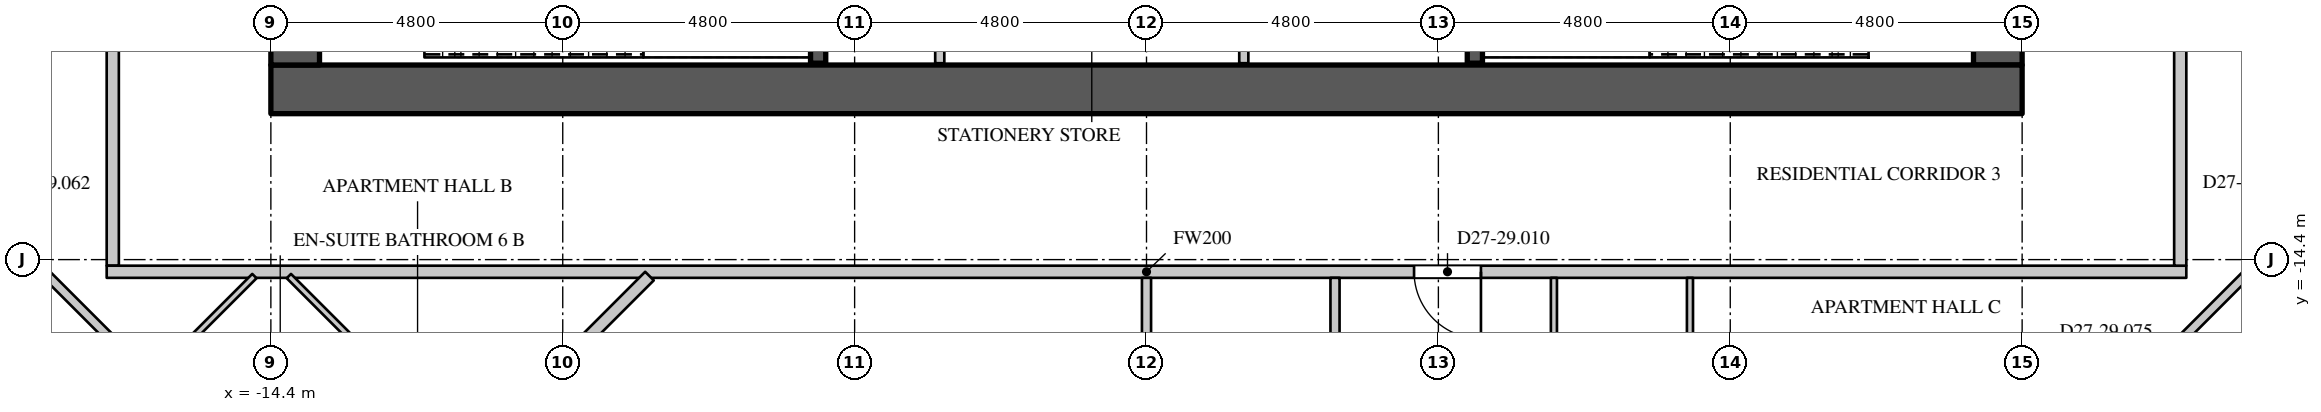
"""IFC4 building model, lengths in metres.
Left out: names, types, materials, properties, quantities, classifications, styles, units other than length and angle.
Written with IfcOpenShell. Run it as: python <this file> out.ifc"""

import sys

from ifc_helpers import new_model, si_unit, direction, frame, frame_2d, origin, place, context, subcontext, project, spatial, rectangle, extrude, element, fill, save


model = new_model("IFC4")
c1 = context("Model", 3, precision=1e-05, world=origin(), true_north=direction((0.0, 1.0)))
c2 = subcontext(c1, "Body", "Model", "MODEL_VIEW")
j1 = project(units=[si_unit("LENGTHUNIT", "METRE"), si_unit("PLANEANGLEUNIT", "RADIAN")], contexts=[c1])
p1 = place(None, origin())
s1 = spatial("IfcSite", under=j1, at=p1, CompositionType="ELEMENT")
p2 = place(p1, origin())
s2 = spatial("IfcBuilding", under=s1, at=p2, CompositionType="ELEMENT")
p3 = place(p2, frame((0.0, 0.0, 119.1)))
s3 = spatial("IfcBuildingStorey", under=s2, at=p3, CompositionType="ELEMENT", Elevation=119.1)
p4 = place(p3, frame((-14.4, -11.6, 0.0), z_axis=(0.0, 0.0, 1.0), x_axis=(1.0, 0.0, 0.0)))
e1 = element("IfcWall", 1, at=p4, inside=s3, PredefinedType="SHEAR", context=c2, shape_type="SweptSolid", body=[
    extrude(rectangle(XDim=28.8, YDim=0.8, at=frame_2d((14.4, 0.0))), origin(), (0.0, 0.0, 1.0), 4.2),
])
p5 = place(p3, frame((14.0, -11.2, 0.0), z_axis=(0.0, 0.0, 1.0), x_axis=(0.0, 1.0, 0.0)))
e2 = element("IfcWall", 2, at=p5, inside=s3, PredefinedType="SHEAR", context=c2, shape_type="SweptSolid", body=[
    extrude(rectangle(XDim=22.4, YDim=0.8, at=frame_2d((11.2, 0.0))), origin(), (0.0, 0.0, 1.0), 4.2),
])
p6 = place(p5, frame((20.25, 0.0, 0.0)))
e3 = element("IfcOpeningElement", 3, at=p6, cuts=e2, PredefinedType="OPENING", context=c2, shape_type="SweptSolid", body=[
    extrude(rectangle(XDim=1.1, YDim=2.2, at=frame_2d((0.55, 1.1))), frame((0.0, 0.41, 0.0), z_axis=(0.0, -1.0, 0.0), x_axis=(1.0, 0.0, 0.0)), (0.0, 0.0, 1.0), 0.82),
])
p7 = place(p5, frame((1.05, 0.0, 0.0)))
e4 = element("IfcOpeningElement", 4, at=p7, cuts=e2, PredefinedType="OPENING", context=c2, shape_type="SweptSolid", body=[
    extrude(rectangle(XDim=1.1, YDim=2.2, at=frame_2d((0.55, 1.1))), frame((0.0, 0.41, 0.0), z_axis=(0.0, -1.0, 0.0), x_axis=(1.0, 0.0, 0.0)), (0.0, 0.0, 1.0), 0.82),
])
p8 = place(p5, frame((14.75, 0.0, 0.0)))
e5 = element("IfcOpeningElement", 5, at=p8, cuts=e2, PredefinedType="OPENING", context=c2, shape_type="SweptSolid", body=[
    extrude(rectangle(XDim=1.5, YDim=2.4, at=frame_2d((0.75, 1.2))), frame((0.0, 0.41, 0.0), z_axis=(0.0, -1.0, 0.0), x_axis=(1.0, 0.0, 0.0)), (0.0, 0.0, 1.0), 0.82),
])
p9 = place(p5, frame((6.15, 0.0, 0.0)))
e6 = element("IfcOpeningElement", 6, at=p9, cuts=e2, PredefinedType="OPENING", context=c2, shape_type="SweptSolid", body=[
    extrude(rectangle(XDim=1.5, YDim=2.4, at=frame_2d((0.75, 1.2))), frame((0.0, 0.41, 0.0), z_axis=(0.0, -1.0, 0.0), x_axis=(1.0, 0.0, 0.0)), (0.0, 0.0, 1.0), 0.82),
])
p10 = place(p3, frame((-14.0, -11.2, 0.0), z_axis=(0.0, 0.0, 1.0), x_axis=(0.0, 1.0, 0.0)))
e7 = element("IfcWall", 7, at=p10, inside=s3, PredefinedType="SHEAR", context=c2, shape_type="SweptSolid", body=[
    extrude(rectangle(XDim=22.4, YDim=0.8, at=frame_2d((11.2, 0.0))), origin(), (0.0, 0.0, 1.0), 4.2),
])
p11 = place(p10, frame((20.25, 0.0, 0.0)))
e8 = element("IfcOpeningElement", 8, at=p11, cuts=e7, PredefinedType="OPENING", context=c2, shape_type="SweptSolid", body=[
    extrude(rectangle(XDim=1.1, YDim=2.2, at=frame_2d((0.55, 1.1))), frame((0.0, 0.41, 0.0), z_axis=(0.0, -1.0, 0.0), x_axis=(1.0, 0.0, 0.0)), (0.0, 0.0, 1.0), 0.82),
])
p12 = place(p10, frame((1.05, 0.0, 0.0)))
e9 = element("IfcOpeningElement", 9, at=p12, cuts=e7, PredefinedType="OPENING", context=c2, shape_type="SweptSolid", body=[
    extrude(rectangle(XDim=1.1, YDim=2.2, at=frame_2d((0.55, 1.1))), frame((0.0, 0.41, 0.0), z_axis=(0.0, -1.0, 0.0), x_axis=(1.0, 0.0, 0.0)), (0.0, 0.0, 1.0), 0.82),
])
p13 = place(p10, frame((15.95, 0.0, 0.0)))
e10 = element("IfcOpeningElement", 10, at=p13, cuts=e7, PredefinedType="OPENING", context=c2, shape_type="SweptSolid", body=[
    extrude(rectangle(XDim=1.5, YDim=2.4, at=frame_2d((0.75, 1.2))), frame((0.0, 0.41, 0.0), z_axis=(0.0, -1.0, 0.0), x_axis=(1.0, 0.0, 0.0)), (0.0, 0.0, 1.0), 0.82),
])
p14 = place(p10, frame((4.95, 0.0, 0.0)))
e11 = element("IfcOpeningElement", 11, at=p14, cuts=e7, PredefinedType="OPENING", context=c2, shape_type="SweptSolid", body=[
    extrude(rectangle(XDim=1.5, YDim=2.4, at=frame_2d((0.75, 1.2))), frame((0.0, 0.41, 0.0), z_axis=(0.0, -1.0, 0.0), x_axis=(1.0, 0.0, 0.0)), (0.0, 0.0, 1.0), 0.82),
])
p15 = place(p3, frame((-17.0, -14.5, 0.0), z_axis=(0.0, 0.0, 1.0), x_axis=(0.0, 1.0, 0.0)))
e12 = element("IfcWall", 12, at=p15, inside=s3, PredefinedType="PARTITIONING", context=c2, shape_type="SweptSolid", body=[
    extrude(rectangle(XDim=29.0, YDim=0.2, at=frame_2d((14.5, 0.0))), origin(), (0.0, 0.0, 1.0), 3.95),
])
p16 = place(p15, frame((14.3, 0.0, 0.0)))
e13 = element("IfcOpeningElement", 13, at=p16, cuts=e12, PredefinedType="OPENING", context=c2, shape_type="SweptSolid", body=[
    extrude(rectangle(XDim=1.1, YDim=2.4, at=frame_2d((0.55, 1.2))), frame((0.0, 0.11, 0.0), z_axis=(0.0, -1.0, 0.0), x_axis=(1.0, 0.0, 0.0)), (0.0, 0.0, 1.0), 0.22),
])
p17 = place(p3, frame((-17.1, -14.6, 0.0), z_axis=(0.0, 0.0, 1.0), x_axis=(1.0, 0.0, 0.0)))
e14 = element("IfcWall", 14, at=p17, inside=s3, PredefinedType="PARTITIONING", context=c2, shape_type="SweptSolid", body=[
    extrude(rectangle(XDim=34.2, YDim=0.2, at=frame_2d((17.1, 0.0))), origin(), (0.0, 0.0, 1.0), 3.95),
])
p18 = place(p17, frame((21.5, 0.0, 0.0)))
e15 = element("IfcOpeningElement", 15, at=p18, cuts=e14, PredefinedType="OPENING", context=c2, shape_type="SweptSolid", body=[
    extrude(rectangle(XDim=1.1, YDim=2.4, at=frame_2d((0.55, 1.2))), frame((0.0, 0.11, 0.0), z_axis=(0.0, -1.0, 0.0), x_axis=(1.0, 0.0, 0.0)), (0.0, 0.0, 1.0), 0.22),
])
p19 = place(p3, frame((17.0, -14.5, 0.0), z_axis=(0.0, 0.0, 1.0), x_axis=(0.0, 1.0, 0.0)))
e16 = element("IfcWall", 16, at=p19, inside=s3, PredefinedType="PARTITIONING", context=c2, shape_type="SweptSolid", body=[
    extrude(rectangle(XDim=29.0, YDim=0.2, at=frame_2d((14.5, 0.0))), origin(), (0.0, 0.0, 1.0), 3.95),
])
p20 = place(p19, frame((16.5, 0.0, 0.0)))
e17 = element("IfcOpeningElement", 17, at=p20, cuts=e16, PredefinedType="OPENING", context=c2, shape_type="SweptSolid", body=[
    extrude(rectangle(XDim=1.1, YDim=2.4, at=frame_2d((0.55, 1.2))), frame((0.0, 0.11, 0.0), z_axis=(0.0, -1.0, 0.0), x_axis=(1.0, 0.0, 0.0)), (0.0, 0.0, 1.0), 0.22),
])
p21 = place(p3, frame((-19.563, -13.172, 0.0), z_axis=(0.0, 0.0, 1.0), x_axis=(0.707106781187, -0.707106781187, 0.0)))
e18 = element("IfcWall", 18, at=p21, inside=s3, PredefinedType="PARTITIONING", context=c2, shape_type="SweptSolid", body=[
    extrude(rectangle(XDim=4.444, YDim=0.15, at=frame_2d((2.222, 0.0))), origin(), (0.0, 0.0, 1.0), 3.95),
])
p22 = place(p21, frame((0.25, 0.0, 0.0)))
e19 = element("IfcOpeningElement", 19, at=p22, cuts=e18, PredefinedType="OPENING", context=c2, shape_type="SweptSolid", body=[
    extrude(rectangle(XDim=0.95, YDim=2.2, at=frame_2d((0.475, 1.1))), frame((0.0, 0.085, 0.0), z_axis=(0.0, -1.0, 0.0), x_axis=(1.0, 0.0, 0.0)), (0.0, 0.0, 1.0), 0.17),
])
p23 = place(p3, frame((-3.4, -11.17, 0.0), z_axis=(0.0, 0.0, 1.0), x_axis=(0.0, 1.0, 0.0)))
e20 = element("IfcWall", 20, at=p23, inside=s3, PredefinedType="PARTITIONING", context=c2, shape_type="SweptSolid", body=[
    extrude(rectangle(XDim=5.27, YDim=0.15, at=frame_2d((2.635, 0.0))), origin(), (0.0, 0.0, 1.0), 3.95),
])
p24 = place(p3, frame((0.0, -26.455, 0.0), z_axis=(0.0, 0.0, 1.0), x_axis=(0.0, 1.0, 0.0)))
e21 = element("IfcWall", 21, at=p24, inside=s3, PredefinedType="PARTITIONING", context=c2, shape_type="SweptSolid", body=[
    extrude(rectangle(XDim=11.755, YDim=0.15, at=frame_2d((5.877, 0.0))), origin(), (0.0, 0.0, 1.0), 3.95),
])
p25 = place(p24, frame((8.4, 0.0, 0.0)))
e22 = element("IfcOpeningElement", 22, at=p25, cuts=e21, PredefinedType="OPENING", context=c2, shape_type="SweptSolid", body=[
    extrude(rectangle(XDim=0.95, YDim=2.2, at=frame_2d((0.475, 1.1))), frame((0.0, 0.085, 0.0), z_axis=(0.0, -1.0, 0.0), x_axis=(1.0, 0.0, 0.0)), (0.0, 0.0, 1.0), 0.17),
])
p26 = place(p3, frame((1.6, -11.17, 0.0), z_axis=(0.0, 0.0, 1.0), x_axis=(0.0, 1.0, 0.0)))
e23 = element("IfcWall", 23, at=p26, inside=s3, PredefinedType="PARTITIONING", context=c2, shape_type="SweptSolid", body=[
    extrude(rectangle(XDim=5.27, YDim=0.15, at=frame_2d((2.635, 0.0))), origin(), (0.0, 0.0, 1.0), 3.95),
])
p27 = place(p3, frame((3.1, -20.525, 0.0), z_axis=(0.0, 0.0, 1.0), x_axis=(0.0, 1.0, 0.0)))
e24 = element("IfcWall", 24, at=p27, inside=s3, PredefinedType="PARTITIONING", context=c2, shape_type="SweptSolid", body=[
    extrude(rectangle(XDim=5.825, YDim=0.15, at=frame_2d((2.913, 0.0))), origin(), (0.0, 0.0, 1.0), 3.95),
])
p28 = place(p27, frame((2.45, 0.0, 0.0)))
e25 = element("IfcOpeningElement", 25, at=p28, cuts=e24, PredefinedType="OPENING", context=c2, shape_type="SweptSolid", body=[
    extrude(rectangle(XDim=0.95, YDim=2.2, at=frame_2d((0.475, 1.1))), frame((0.0, 0.085, 0.0), z_axis=(0.0, -1.0, 0.0), x_axis=(1.0, 0.0, 0.0)), (0.0, 0.0, 1.0), 0.17),
])
p29 = place(p3, frame((16.42, -16.314, 0.0), z_axis=(0.0, 0.0, 1.0), x_axis=(0.707106781187, 0.707106781187, 0.0)))
e26 = element("IfcWall", 26, at=p29, inside=s3, PredefinedType="PARTITIONING", context=c2, shape_type="SweptSolid", body=[
    extrude(rectangle(XDim=7.117, YDim=0.15, at=frame_2d((3.559, 0.0))), origin(), (0.0, 0.0, 1.0), 3.95),
])
p30 = place(p29, frame((3.25, 0.0, 0.0)))
e27 = element("IfcOpeningElement", 27, at=p30, cuts=e26, PredefinedType="OPENING", context=c2, shape_type="SweptSolid", body=[
    extrude(rectangle(XDim=0.95, YDim=2.2, at=frame_2d((0.475, 1.1))), frame((0.0, 0.085, 0.0), z_axis=(0.0, -1.0, 0.0), x_axis=(1.0, 0.0, 0.0)), (0.0, 0.0, 1.0), 0.17),
])
p31 = place(p29, frame((5.95, 0.0, 0.0)))
e28 = element("IfcOpeningElement", 28, at=p31, cuts=e26, PredefinedType="OPENING", context=c2, shape_type="SweptSolid", body=[
    extrude(rectangle(XDim=0.95, YDim=2.2, at=frame_2d((0.475, 1.1))), frame((0.0, 0.085, 0.0), z_axis=(0.0, -1.0, 0.0), x_axis=(1.0, 0.0, 0.0)), (0.0, 0.0, 1.0), 0.17),
])
p32 = place(p3, frame((-16.693, -23.19, 0.0), z_axis=(0.0, 0.0, 1.0), x_axis=(0.707106781187, 0.707106781187, 0.0)))
e29 = element("IfcWall", 29, at=p32, inside=s3, PredefinedType="PARTITIONING", context=c2, shape_type="SweptSolid", body=[
    extrude(rectangle(XDim=12.049, YDim=0.2, at=frame_2d((6.024, 0.0))), origin(), (0.0, 0.0, 1.0), 3.95),
])
for number, where, z_axis, x_axis in (
    (30, (-5.4, -11.17, 0.0), (0.0, 0.0, 1.0), (0.0, 1.0, 0.0)),
    (31, (5.4, -11.17, 0.0), (0.0, 0.0, 1.0), (0.0, 1.0, 0.0)),
):
    element("IfcWall", number, at=place(p3, frame(where, z_axis=z_axis, x_axis=x_axis)), inside=s3, PredefinedType="SHEAR", context=c2, shape_type="SweptSolid", body=[
        extrude(rectangle(XDim=2.845, YDim=0.25, at=frame_2d((1.422, 0.0))), origin(), (0.0, 0.0, 1.0), 3.95),
    ])
p33 = place(p3, frame((-16.07, -16.07, 0.0), z_axis=(0.0, 0.0, 1.0), x_axis=(0.707106781187, 0.707106781187, 0.0)))
e32 = element("IfcWall", 32, at=p33, inside=s3, PredefinedType="PARTITIONING", context=c2, shape_type="SweptSolid", body=[
    extrude(rectangle(XDim=1.979, YDim=0.1, at=frame_2d((0.99, 0.0))), origin(), (0.0, 0.0, 1.0), 3.95),
])
p34 = place(p3, frame((-14.104, -14.671, 0.0), z_axis=(0.0, 0.0, 1.0), x_axis=(0.707056944574, -0.707156614287, 0.0)))
e33 = element("IfcWall", 33, at=p34, inside=s3, PredefinedType="PARTITIONING", context=c2, shape_type="SweptSolid", body=[
    extrude(rectangle(XDim=2.449, YDim=0.1, at=frame_2d((1.225, 0.0))), origin(), (0.0, 0.0, 1.0), 3.95),
])
p35 = place(p3, frame((6.7, -20.525, 0.0), z_axis=(0.0, 0.0, 1.0), x_axis=(0.0, 1.0, 0.0)))
e34 = element("IfcWall", 34, at=p35, inside=s3, PredefinedType="PARTITIONING", context=c2, shape_type="SweptSolid", body=[
    extrude(rectangle(XDim=5.825, YDim=0.1, at=frame_2d((2.913, 0.0))), origin(), (0.0, 0.0, 1.0), 3.95),
])
p36 = place(p35, frame((2.45, 0.0, 0.0)))
e35 = element("IfcOpeningElement", 35, at=p36, cuts=e34, PredefinedType="OPENING", context=c2, shape_type="SweptSolid", body=[
    extrude(rectangle(XDim=0.9, YDim=2.2, at=frame_2d((0.45, 1.1))), frame((0.0, 0.06, 0.0), z_axis=(0.0, -1.0, 0.0), x_axis=(1.0, 0.0, 0.0)), (0.0, 0.0, 1.0), 0.12),
])
p37 = place(p3, frame((8.937, -20.62, 0.0), z_axis=(0.0, 0.0, 1.0), x_axis=(0.0, 1.0, 0.0)))
e36 = element("IfcWall", 36, at=p37, inside=s3, PredefinedType="PARTITIONING", context=c2, shape_type="SweptSolid", body=[
    extrude(rectangle(XDim=5.92, YDim=0.1, at=frame_2d((2.96, 0.0))), origin(), (0.0, 0.0, 1.0), 3.95),
])
p38 = place(p37, frame((2.55, 0.0, 0.0)))
e37 = element("IfcOpeningElement", 37, at=p38, cuts=e36, PredefinedType="OPENING", context=c2, shape_type="SweptSolid", body=[
    extrude(rectangle(XDim=0.9, YDim=2.2, at=frame_2d((0.45, 1.1))), frame((0.0, 0.06, 0.0), z_axis=(0.0, -1.0, 0.0), x_axis=(1.0, 0.0, 0.0)), (0.0, 0.0, 1.0), 0.12),
])
p39 = place(p18, origin())
e38 = element("IfcDoor", 38, at=p39, inside=s3, OperationType="SINGLE_SWING_LEFT", PredefinedType="DOOR", context=c2, shape_type="SweptSolid", body=[
    extrude(rectangle(XDim=1.1, YDim=2.4, at=frame_2d((0.55, 1.2))), frame((0.0, 0.025, 0.0), z_axis=(0.0, -1.0, 0.0), x_axis=(1.0, 0.0, 0.0)), (0.0, 0.0, 1.0), 0.05),
])
fill(e15, e38)
save(model, sys.argv[1])
